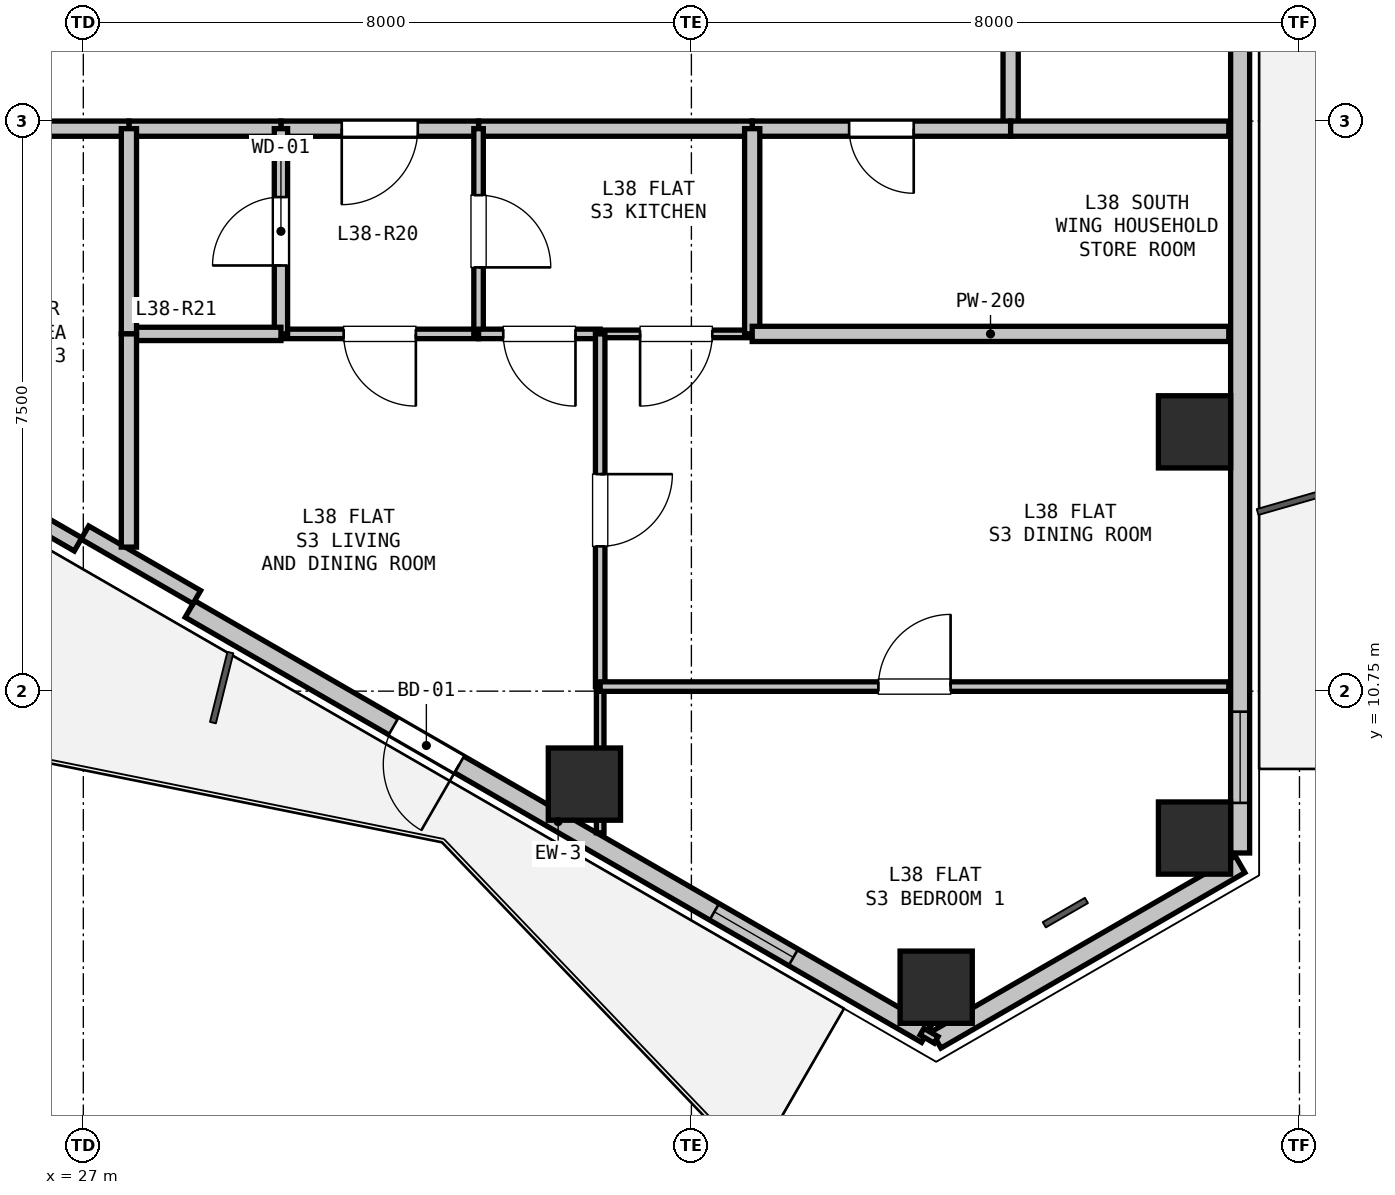
"""IFC4 building model, lengths in metres.
Left out: names, types, materials, properties, quantities, classifications, styles, units other than length and angle.
Written with IfcOpenShell. Run it as: python <this file> out.ifc"""

import sys

from ifc_helpers import new_model, si_unit, direction, frame, frame_2d, origin, origin_2d, place, context, subcontext, project, spatial, rectangle, hollow_rectangle, extrude, element, fill, save


model = new_model("IFC4")
c1 = context("Model", 3, precision=1e-05, world=origin(), true_north=direction((0.0, 1.0)))
c2 = subcontext(c1, "Body", "Model", "MODEL_VIEW")
j1 = project(units=[si_unit("LENGTHUNIT", "METRE"), si_unit("PLANEANGLEUNIT", "RADIAN")], contexts=[c1])
p1 = place(None, origin())
s1 = spatial("IfcSite", under=j1, at=p1, CompositionType="ELEMENT")
p2 = place(p1, origin())
s2 = spatial("IfcBuilding", under=s1, at=p2, CompositionType="ELEMENT")
p3 = place(p2, frame((0.0, 0.0, 137.7)))
s3 = spatial("IfcBuildingStorey", under=s2, at=p3, CompositionType="ELEMENT", Elevation=137.7)
for number, where, z_axis, x_axis in (
    (1, (41.619, 14.161, 0.0), (0.0, 0.0, 1.0), (1.0, 0.0, 0.0)),
    (2, (41.619, 8.817, 0.0), (0.0, 0.0, 1.0), (1.0, 0.0, 0.0)),
    (3, (38.22, 6.855, 0.0), (0.0, 0.0, 1.0), (1.0, 0.0, 0.0)),
    (4, (33.593, 9.527, 0.0), (0.0, 0.0, 1.0), (1.0, 0.0, 0.0)),
):
    element("IfcColumn", number, at=place(p3, frame(where, z_axis=z_axis, x_axis=x_axis)), inside=s3, PredefinedType="COLUMN", context=c2, shape_type="SweptSolid", body=[
        extrude(hollow_rectangle(XDim=0.95, YDim=0.95, WallThickness=0.028, at=origin_2d()), origin(), (0.0, 0.0, 1.0), 3.3),
    ])
p4 = place(p3, frame((42.219, 8.471, 0.0), z_axis=(0.0, 0.0, 1.0), x_axis=(-0.866035021055, -0.499983342029, 0.0)))
e5 = element("IfcWall", 5, at=p4, inside=s3, PredefinedType="SOLIDWALL", context=c2, shape_type="SweptSolid", body=[
    extrude(rectangle(XDim=4.617, YDim=0.25, at=frame_2d((2.309, 0.0))), origin(), (0.0, 0.0, 1.0), 2.68),
])
p5 = place(p3, frame((42.219, 19.807, 0.0), z_axis=(0.0, 0.0, 1.0), x_axis=(0.0, -1.0, 0.0)))
e6 = element("IfcWall", 6, at=p5, inside=s3, PredefinedType="SOLIDWALL", context=c2, shape_type="SweptSolid", body=[
    extrude(rectangle(XDim=11.186, YDim=0.25, at=frame_2d((5.593, 0.0))), origin(), (0.0, 0.0, 1.0), 2.68),
])
p6 = place(p5, frame((9.327, 0.0, 0.9)))
e7 = element("IfcOpeningElement", 7, at=p6, cuts=e6, PredefinedType="OPENING", context=c2, shape_type="SweptSolid", body=[
    extrude(rectangle(XDim=1.2, YDim=1.4, at=frame_2d((0.6, 0.7))), frame((0.0, 0.135, 0.0), z_axis=(0.0, -1.0, 0.0), x_axis=(1.0, 0.0, 0.0)), (0.0, 0.0, 1.0), 0.27),
])
p7 = place(p3, frame((38.091, 6.237, 0.0), z_axis=(0.0, 0.0, 1.0), x_axis=(-0.86602239209, 0.500005216371, 0.0)))
e8 = element("IfcWall", 8, at=p7, inside=s3, PredefinedType="SOLIDWALL", context=c2, shape_type="SweptSolid", body=[
    extrude(rectangle(XDim=11.186, YDim=0.25, at=frame_2d((5.593, 0.0))), origin(), (0.0, 0.0, 1.0), 2.68),
])
p8 = place(p7, frame((7.095, 0.0, 0.0)))
e9 = element("IfcOpeningElement", 9, at=p8, cuts=e8, PredefinedType="OPENING", context=c2, shape_type="SweptSolid", body=[
    extrude(rectangle(XDim=1.0, YDim=2.1, at=frame_2d((0.5, 1.05))), frame((0.0, 0.135, 0.0), z_axis=(0.0, -1.0, 0.0), x_axis=(1.0, 0.0, 0.0)), (0.0, 0.0, 1.0), 0.27),
])
p9 = place(p7, frame((2.02, 0.0, 0.9)))
e10 = element("IfcOpeningElement", 10, at=p9, cuts=e8, PredefinedType="OPENING", context=c2, shape_type="SweptSolid", body=[
    extrude(rectangle(XDim=1.2, YDim=1.4, at=frame_2d((0.6, 0.7))), frame((0.0, 0.135, 0.0), z_axis=(0.0, -1.0, 0.0), x_axis=(1.0, 0.0, 0.0)), (0.0, 0.0, 1.0), 0.27),
])
p10 = place(p3, frame((26.931, 12.68, 0.0), z_axis=(0.0, 0.0, 1.0), x_axis=(-0.866026619769, 0.499997893847, 0.0)))
e11 = element("IfcWall", 11, at=p10, inside=s3, PredefinedType="PARAPET", context=c2, shape_type="SweptSolid", body=[
    extrude(rectangle(XDim=10.486, YDim=0.2, at=frame_2d((5.243, 0.0))), origin(), (0.0, 0.0, 1.0), 0.2),
])
p11 = place(p3, frame((28.493, 11.986, 0.0), z_axis=(0.0, 0.0, 1.0), x_axis=(-0.86605165483, 0.499954529098, 0.0)))
e12 = element("IfcWall", 12, at=p11, inside=s3, PredefinedType="PARAPET", context=c2, shape_type="SweptSolid", body=[
    extrude(rectangle(XDim=1.7, YDim=0.2, at=frame_2d((0.85, 0.0))), origin(), (0.0, 0.0, 1.0), 2.68),
])
p12 = place(p3, frame((39.2, 19.9, 0.0), z_axis=(0.0, 0.0, 1.0), x_axis=(0.0, -1.0, 0.0)))
e13 = element("IfcWall", 13, at=p12, inside=s3, PredefinedType="PARTITIONING", context=c2, shape_type="SweptSolid", body=[
    extrude(rectangle(XDim=1.75, YDim=0.2, at=frame_2d((0.875, 0.0))), origin(), (0.0, 0.0, 1.0), 3.06),
])
p13 = place(p3, frame((39.2, 18.15, 0.0), z_axis=(0.0, 0.0, 1.0), x_axis=(-1.0, 0.0, 0.0)))
e14 = element("IfcWall", 14, at=p13, inside=s3, PredefinedType="PARTITIONING", context=c2, shape_type="SweptSolid", body=[
    extrude(rectangle(XDim=3.4, YDim=0.2, at=frame_2d((1.7, 0.0))), origin(), (0.0, 0.0, 1.0), 2.433),
])
p14 = place(p13, frame((1.275, 0.0, 0.0)))
e15 = element("IfcOpeningElement", 15, at=p14, cuts=e14, PredefinedType="OPENING", context=c2, shape_type="SweptSolid", body=[
    extrude(rectangle(XDim=0.85, YDim=2.1, at=frame_2d((0.425, 1.05))), frame((0.0, 0.11, 0.0), z_axis=(0.0, -1.0, 0.0), x_axis=(1.0, 0.0, 0.0)), (0.0, 0.0, 1.0), 0.22),
])
p15 = place(p3, frame((35.8, 18.15, 0.0), z_axis=(0.0, 0.0, 1.0), x_axis=(-1.0, 0.0, 0.0)))
e16 = element("IfcWall", 16, at=p15, inside=s3, PredefinedType="PARTITIONING", context=c2, shape_type="SweptSolid", body=[
    extrude(rectangle(XDim=3.6, YDim=0.2, at=frame_2d((1.8, 0.0))), origin(), (0.0, 0.0, 1.0), 3.06),
])
p16 = place(p3, frame((32.2, 18.15, 0.0), z_axis=(0.0, 0.0, 1.0), x_axis=(-1.0, 0.0, 0.0)))
e17 = element("IfcWall", 17, at=p16, inside=s3, PredefinedType="PARTITIONING", context=c2, shape_type="SweptSolid", body=[
    extrude(rectangle(XDim=2.6, YDim=0.2, at=frame_2d((1.3, 0.0))), origin(), (0.0, 0.0, 1.0), 3.06),
])
p17 = place(p16, frame((0.8, 0.0, 0.0)))
e18 = element("IfcOpeningElement", 18, at=p17, cuts=e17, PredefinedType="OPENING", context=c2, shape_type="SweptSolid", body=[
    extrude(rectangle(XDim=1.0, YDim=2.15, at=frame_2d((0.5, 1.075))), frame((0.0, 0.11, 0.0), z_axis=(0.0, -1.0, 0.0), x_axis=(1.0, 0.0, 0.0)), (0.0, 0.0, 1.0), 0.22),
])
p18 = place(p3, frame((29.6, 18.15, 0.0), z_axis=(0.0, 0.0, 1.0), x_axis=(-1.0, 0.0, 0.0)))
e19 = element("IfcWall", 19, at=p18, inside=s3, PredefinedType="PARTITIONING", context=c2, shape_type="SweptSolid", body=[
    extrude(rectangle(XDim=2.0, YDim=0.2, at=frame_2d((1.0, 0.0))), origin(), (0.0, 0.0, 1.0), 3.06),
])
p19 = place(p3, frame((27.6, 18.15, 0.0), z_axis=(0.0, 0.0, 1.0), x_axis=(-1.0, 0.0, 0.0)))
e20 = element("IfcWall", 20, at=p19, inside=s3, PredefinedType="PARTITIONING", context=c2, shape_type="SweptSolid", body=[
    extrude(rectangle(XDim=3.2, YDim=0.2, at=frame_2d((1.6, 0.0))), origin(), (0.0, 0.0, 1.0), 2.433),
])
p20 = place(p19, frame((1.1, 0.0, 0.0)))
e21 = element("IfcOpeningElement", 21, at=p20, cuts=e20, PredefinedType="OPENING", context=c2, shape_type="SweptSolid", body=[
    extrude(rectangle(XDim=1.0, YDim=2.15, at=frame_2d((0.5, 1.075))), frame((0.0, 0.11, 0.0), z_axis=(0.0, -1.0, 0.0), x_axis=(1.0, 0.0, 0.0)), (0.0, 0.0, 1.0), 0.22),
])
p21 = place(p3, frame((32.2, 15.45, 0.0), z_axis=(0.0, 0.0, 1.0), x_axis=(-1.0, 0.0, 0.0)))
e22 = element("IfcWall", 22, at=p21, inside=s3, PredefinedType="PARTITIONING", context=c2, shape_type="SweptSolid", body=[
    extrude(rectangle(XDim=2.6, YDim=0.125, at=frame_2d((1.3, 0.0))), origin(), (0.0, 0.0, 1.0), 3.06),
])
p22 = place(p21, frame((0.825, 0.0, 0.0)))
e23 = element("IfcOpeningElement", 23, at=p22, cuts=e22, PredefinedType="OPENING", context=c2, shape_type="SweptSolid", body=[
    extrude(rectangle(XDim=0.95, YDim=2.1, at=frame_2d((0.475, 1.05))), frame((0.0, 0.073, 0.0), z_axis=(0.0, -1.0, 0.0), x_axis=(1.0, 0.0, 0.0)), (0.0, 0.0, 1.0), 0.145),
])
p23 = place(p3, frame((29.6, 15.45, 0.0), z_axis=(0.0, 0.0, 1.0), x_axis=(0.0, 1.0, 0.0)))
e24 = element("IfcWall", 24, at=p23, inside=s3, PredefinedType="PLUMBINGWALL", context=c2, shape_type="SweptSolid", body=[
    extrude(rectangle(XDim=2.7, YDim=0.175, at=frame_2d((1.35, 0.0))), origin(), (0.0, 0.0, 1.0), 3.06),
])
p24 = place(p23, frame((0.9, 0.0, 0.0)))
e25 = element("IfcOpeningElement", 25, at=p24, cuts=e24, PredefinedType="OPENING", context=c2, shape_type="SweptSolid", body=[
    extrude(rectangle(XDim=0.9, YDim=2.1, at=frame_2d((0.45, 1.05))), frame((0.0, 0.097, 0.0), z_axis=(0.0, -1.0, 0.0), x_axis=(1.0, 0.0, 0.0)), (0.0, 0.0, 1.0), 0.195),
])
p25 = place(p3, frame((32.2, 18.15, 0.0), z_axis=(0.0, 0.0, 1.0), x_axis=(0.0, -1.0, 0.0)))
e26 = element("IfcWall", 26, at=p25, inside=s3, PredefinedType="PARTITIONING", context=c2, shape_type="SweptSolid", body=[
    extrude(rectangle(XDim=2.7, YDim=0.125, at=frame_2d((1.35, 0.0))), origin(), (0.0, 0.0, 1.0), 3.06),
])
p26 = place(p25, frame((0.875, 0.0, 0.0)))
e27 = element("IfcOpeningElement", 27, at=p26, cuts=e26, PredefinedType="OPENING", context=c2, shape_type="SweptSolid", body=[
    extrude(rectangle(XDim=0.95, YDim=2.1, at=frame_2d((0.475, 1.05))), frame((0.0, 0.073, 0.0), z_axis=(0.0, -1.0, 0.0), x_axis=(1.0, 0.0, 0.0)), (0.0, 0.0, 1.0), 0.145),
])
p27 = place(p3, frame((29.6, 15.45, 0.0), z_axis=(0.0, 0.0, 1.0), x_axis=(-1.0, 0.0, 0.0)))
e28 = element("IfcWall", 28, at=p27, inside=s3, PredefinedType="PLUMBINGWALL", context=c2, shape_type="SweptSolid", body=[
    extrude(rectangle(XDim=2.0, YDim=0.175, at=frame_2d((1.0, 0.0))), origin(), (0.0, 0.0, 1.0), 3.06),
])
p28 = place(p3, frame((27.6, 15.45, 0.0), z_axis=(0.0, 0.0, 1.0), x_axis=(0.0, 1.0, 0.0)))
e29 = element("IfcWall", 29, at=p28, inside=s3, PredefinedType="PARTITIONING", context=c2, shape_type="SweptSolid", body=[
    extrude(rectangle(XDim=2.7, YDim=0.2, at=frame_2d((1.35, 0.0))), origin(), (0.0, 0.0, 1.0), 3.06),
])
p29 = place(p3, frame((35.8, 15.45, 0.0), z_axis=(0.0, 0.0, 1.0), x_axis=(-1.0, 0.0, 0.0)))
e30 = element("IfcWall", 30, at=p29, inside=s3, PredefinedType="PARTITIONING", context=c2, shape_type="SweptSolid", body=[
    extrude(rectangle(XDim=2.0, YDim=0.1, at=frame_2d((1.0, 0.0))), origin(), (0.0, 0.0, 1.0), 3.06),
])
p30 = place(p29, frame((0.525, 0.0, 0.0)))
e31 = element("IfcOpeningElement", 31, at=p30, cuts=e30, PredefinedType="OPENING", context=c2, shape_type="SweptSolid", body=[
    extrude(rectangle(XDim=0.95, YDim=2.1, at=frame_2d((0.475, 1.05))), frame((0.0, 0.06, 0.0), z_axis=(0.0, -1.0, 0.0), x_axis=(1.0, 0.0, 0.0)), (0.0, 0.0, 1.0), 0.12),
])
p31 = place(p3, frame((33.8, 15.45, 0.0), z_axis=(0.0, 0.0, 1.0), x_axis=(-1.0, 0.0, 0.0)))
e32 = element("IfcWall", 32, at=p31, inside=s3, PredefinedType="PARTITIONING", context=c2, shape_type="SweptSolid", body=[
    extrude(rectangle(XDim=1.6, YDim=0.125, at=frame_2d((0.8, 0.0))), origin(), (0.0, 0.0, 1.0), 3.06),
])
p32 = place(p31, frame((0.325, 0.0, 0.0)))
e33 = element("IfcOpeningElement", 33, at=p32, cuts=e32, PredefinedType="OPENING", context=c2, shape_type="SweptSolid", body=[
    extrude(rectangle(XDim=0.95, YDim=2.1, at=frame_2d((0.475, 1.05))), frame((0.0, 0.073, 0.0), z_axis=(0.0, -1.0, 0.0), x_axis=(1.0, 0.0, 0.0)), (0.0, 0.0, 1.0), 0.145),
])
p33 = place(p3, frame((35.8, 18.15, 0.0), z_axis=(0.0, 0.0, 1.0), x_axis=(0.0, -1.0, 0.0)))
e34 = element("IfcWall", 34, at=p33, inside=s3, PredefinedType="PARTITIONING", context=c2, shape_type="SweptSolid", body=[
    extrude(rectangle(XDim=2.7, YDim=0.2, at=frame_2d((1.35, 0.0))), origin(), (0.0, 0.0, 1.0), 3.06),
])
p34 = place(p3, frame((39.2, 18.15, 0.0), z_axis=(0.0, 0.0, 1.0), x_axis=(1.0, 0.0, 0.0)))
e35 = element("IfcWall", 35, at=p34, inside=s3, PredefinedType="PARTITIONING", context=c2, shape_type="SweptSolid", body=[
    extrude(rectangle(XDim=2.87, YDim=0.2, at=frame_2d((1.435, 0.0))), origin(), (0.0, 0.0, 1.0), 2.365),
])
p35 = place(p3, frame((42.07, 15.45, 0.0), z_axis=(0.0, 0.0, 1.0), x_axis=(-1.0, 0.0, 0.0)))
e36 = element("IfcWall", 36, at=p35, inside=s3, PredefinedType="PARTITIONING", context=c2, shape_type="SweptSolid", body=[
    extrude(rectangle(XDim=6.27, YDim=0.2, at=frame_2d((3.135, 0.0))), origin(), (0.0, 0.0, 1.0), 2.365),
])
p36 = place(p3, frame((27.6, 15.45, 0.0), z_axis=(0.0, 0.0, 1.0), x_axis=(0.0, -1.0, 0.0)))
e37 = element("IfcWall", 37, at=p36, inside=s3, PredefinedType="PARTITIONING", context=c2, shape_type="SweptSolid", body=[
    extrude(rectangle(XDim=2.805, YDim=0.2, at=frame_2d((1.402, 0.0))), origin(), (0.0, 0.0, 1.0), 2.365),
])
p37 = place(p3, frame((33.8, 15.45, 0.0), z_axis=(0.0, 0.0, 1.0), x_axis=(0.0, -1.0, 0.0)))
e38 = element("IfcWall", 38, at=p37, inside=s3, PredefinedType="PARTITIONING", context=c2, shape_type="SweptSolid", body=[
    extrude(rectangle(XDim=4.64, YDim=0.125, at=frame_2d((2.32, 0.0))), origin(), (0.0, 0.0, 1.0), 3.06),
])
p38 = place(p37, frame((1.845, 0.0, 0.0)))
e39 = element("IfcOpeningElement", 39, at=p38, cuts=e38, PredefinedType="OPENING", context=c2, shape_type="SweptSolid", body=[
    extrude(rectangle(XDim=0.95, YDim=2.1, at=frame_2d((0.475, 1.05))), frame((0.0, 0.073, 0.0), z_axis=(0.0, -1.0, 0.0), x_axis=(1.0, 0.0, 0.0)), (0.0, 0.0, 1.0), 0.145),
])
p39 = place(p3, frame((33.8, 10.81, 0.0), z_axis=(0.0, 0.0, 1.0), x_axis=(0.0, -1.0, 0.0)))
e40 = element("IfcWall", 40, at=p39, inside=s3, PredefinedType="PARTITIONING", context=c2, shape_type="SweptSolid", body=[
    extrude(rectangle(XDim=1.923, YDim=0.1, at=frame_2d((0.962, 0.0))), origin(), (0.0, 0.0, 1.0), 3.06),
])
p40 = place(p3, frame((33.8, 10.81, 0.0), z_axis=(0.0, 0.0, 1.0), x_axis=(1.0, 0.0, 0.0)))
e41 = element("IfcWall", 41, at=p40, inside=s3, PredefinedType="PARTITIONING", context=c2, shape_type="SweptSolid", body=[
    extrude(rectangle(XDim=8.27, YDim=0.125, at=frame_2d((4.135, 0.0))), origin(), (0.0, 0.0, 1.0), 2.433),
])
p41 = place(p40, frame((3.66, 0.0, 0.0)))
e42 = element("IfcOpeningElement", 42, at=p41, cuts=e41, PredefinedType="OPENING", context=c2, shape_type="SweptSolid", body=[
    extrude(rectangle(XDim=0.95, YDim=2.1, at=frame_2d((0.475, 1.05))), frame((0.0, 0.073, 0.0), z_axis=(0.0, -1.0, 0.0), x_axis=(1.0, 0.0, 0.0)), (0.0, 0.0, 1.0), 0.145),
])
p42 = place(p3, frame((38.221, 6.162, 0.0), z_axis=(0.0, 0.0, 1.0), x_axis=(-0.865581379588, 0.500768285049, 0.0)))
e43 = element("IfcWall", 43, at=p42, inside=s3, PredefinedType="PARTITIONING", context=c2, shape_type="SweptSolid", body=[
    extrude(rectangle(XDim=0.216, YDim=0.1, at=frame_2d((0.108, 0.0))), origin(), (0.0, 0.0, 1.0), 3.06),
])
p43 = place(p6, origin())
e44 = element("IfcWindow", 44, at=p43, inside=s3, PartitioningType="SINGLE_PANEL", PredefinedType="WINDOW", context=c2, shape_type="SweptSolid", body=[
    extrude(rectangle(XDim=1.2, YDim=1.4, at=frame_2d((0.6, 0.7))), frame((0.0, 0.03, 0.0), z_axis=(0.0, -1.0, 0.0), x_axis=(1.0, 0.0, 0.0)), (0.0, 0.0, 1.0), 0.06),
])
fill(e7, e44)
p44 = place(p8, origin())
e45 = element("IfcDoor", 45, at=p44, inside=s3, OperationType="SINGLE_SWING_LEFT", PredefinedType="DOOR", context=c2, shape_type="SweptSolid", body=[
    extrude(rectangle(XDim=1.0, YDim=2.1, at=frame_2d((0.5, 1.05))), frame((0.0, 0.025, 0.0), z_axis=(0.0, -1.0, 0.0), x_axis=(1.0, 0.0, 0.0)), (0.0, 0.0, 1.0), 0.05),
])
fill(e9, e45)
p45 = place(p9, origin())
e46 = element("IfcWindow", 46, at=p45, inside=s3, PartitioningType="SINGLE_PANEL", PredefinedType="WINDOW", context=c2, shape_type="SweptSolid", body=[
    extrude(rectangle(XDim=1.2, YDim=1.4, at=frame_2d((0.6, 0.7))), frame((0.0, 0.03, 0.0), z_axis=(0.0, -1.0, 0.0), x_axis=(1.0, 0.0, 0.0)), (0.0, 0.0, 1.0), 0.06),
])
fill(e10, e46)
p46 = place(p17, origin())
e47 = element("IfcDoor", 47, at=p46, inside=s3, OperationType="SINGLE_SWING_RIGHT", PredefinedType="DOOR", context=c2, shape_type="SweptSolid", body=[
    extrude(rectangle(XDim=1.0, YDim=2.15, at=frame_2d((0.5, 1.075))), frame((0.0, 0.025, 0.0), z_axis=(0.0, -1.0, 0.0), x_axis=(1.0, 0.0, 0.0)), (0.0, 0.0, 1.0), 0.05),
])
fill(e18, e47)
p47 = place(p14, origin())
e48 = element("IfcDoor", 48, at=p47, inside=s3, OperationType="SINGLE_SWING_LEFT", PredefinedType="DOOR", context=c2, shape_type="SweptSolid", body=[
    extrude(rectangle(XDim=0.85, YDim=2.1, at=frame_2d((0.425, 1.05))), frame((0.0, 0.025, 0.0), z_axis=(0.0, -1.0, 0.0), x_axis=(1.0, 0.0, 0.0)), (0.0, 0.0, 1.0), 0.05),
])
fill(e15, e48)
p48 = place(p24, origin())
e49 = element("IfcDoor", 49, at=p48, inside=s3, OperationType="SINGLE_SWING_LEFT", PredefinedType="DOOR", context=c2, shape_type="SweptSolid", body=[
    extrude(rectangle(XDim=0.9, YDim=2.1, at=frame_2d((0.45, 1.05))), frame((0.0, 0.025, 0.0), z_axis=(0.0, -1.0, 0.0), x_axis=(1.0, 0.0, 0.0)), (0.0, 0.0, 1.0), 0.05),
])
fill(e25, e49)
p49 = place(p26, origin())
e50 = element("IfcDoor", 50, at=p49, inside=s3, OperationType="SINGLE_SWING_RIGHT", PredefinedType="DOOR", context=c2, shape_type="SweptSolid", body=[
    extrude(rectangle(XDim=0.95, YDim=2.1, at=frame_2d((0.475, 1.05))), frame((0.0, 0.025, 0.0), z_axis=(0.0, -1.0, 0.0), x_axis=(1.0, 0.0, 0.0)), (0.0, 0.0, 1.0), 0.05),
])
fill(e27, e50)
p50 = place(p22, origin())
e51 = element("IfcDoor", 51, at=p50, inside=s3, OperationType="SINGLE_SWING_LEFT", PredefinedType="DOOR", context=c2, shape_type="SweptSolid", body=[
    extrude(rectangle(XDim=0.95, YDim=2.1, at=frame_2d((0.475, 1.05))), frame((0.0, 0.025, 0.0), z_axis=(0.0, -1.0, 0.0), x_axis=(1.0, 0.0, 0.0)), (0.0, 0.0, 1.0), 0.05),
])
fill(e23, e51)
p51 = place(p32, origin())
e52 = element("IfcDoor", 52, at=p51, inside=s3, OperationType="SINGLE_SWING_LEFT", PredefinedType="DOOR", context=c2, shape_type="SweptSolid", body=[
    extrude(rectangle(XDim=0.95, YDim=2.1, at=frame_2d((0.475, 1.05))), frame((0.0, 0.025, 0.0), z_axis=(0.0, -1.0, 0.0), x_axis=(1.0, 0.0, 0.0)), (0.0, 0.0, 1.0), 0.05),
])
fill(e33, e52)
p52 = place(p30, origin())
e53 = element("IfcDoor", 53, at=p52, inside=s3, OperationType="SINGLE_SWING_RIGHT", PredefinedType="DOOR", context=c2, shape_type="SweptSolid", body=[
    extrude(rectangle(XDim=0.95, YDim=2.1, at=frame_2d((0.475, 1.05))), frame((0.0, 0.025, 0.0), z_axis=(0.0, -1.0, 0.0), x_axis=(1.0, 0.0, 0.0)), (0.0, 0.0, 1.0), 0.05),
])
fill(e31, e53)
p53 = place(p38, origin())
e54 = element("IfcDoor", 54, at=p53, inside=s3, OperationType="SINGLE_SWING_LEFT", PredefinedType="DOOR", context=c2, shape_type="SweptSolid", body=[
    extrude(rectangle(XDim=0.95, YDim=2.1, at=frame_2d((0.475, 1.05))), frame((0.0, 0.025, 0.0), z_axis=(0.0, -1.0, 0.0), x_axis=(1.0, 0.0, 0.0)), (0.0, 0.0, 1.0), 0.05),
])
fill(e39, e54)
p54 = place(p41, origin())
e55 = element("IfcDoor", 55, at=p54, inside=s3, OperationType="SINGLE_SWING_RIGHT", PredefinedType="DOOR", context=c2, shape_type="SweptSolid", body=[
    extrude(rectangle(XDim=0.95, YDim=2.1, at=frame_2d((0.475, 1.05))), frame((0.0, 0.025, 0.0), z_axis=(0.0, -1.0, 0.0), x_axis=(1.0, 0.0, 0.0)), (0.0, 0.0, 1.0), 0.05),
])
fill(e42, e55)
save(model, sys.argv[1])
